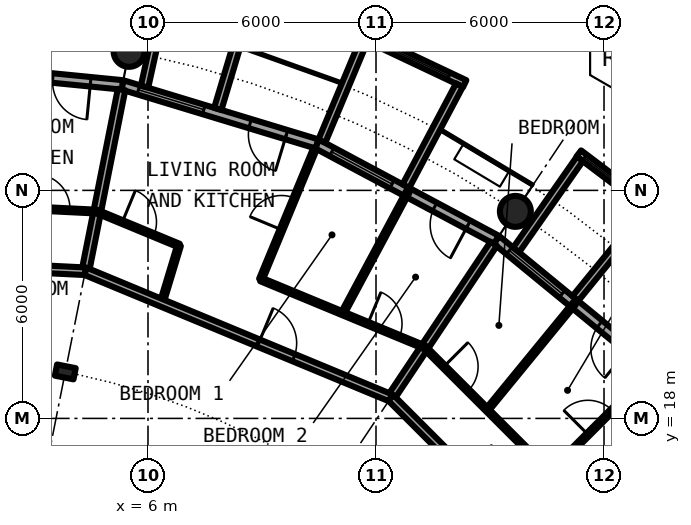
"""IFC4 building model, lengths in metres.
Left out: names, types, materials, properties, quantities, classifications, styles, units other than length and angle.
Written with IfcOpenShell. Run it as: python <this file> out.ifc"""

import sys

from ifc_helpers import new_model, si_unit, direction, frame, frame_2d, origin, origin_2d, place, context, subcontext, project, spatial, rectangle, circle, hollow_circle, i_section, extrude, element, fill, save


model = new_model("IFC4")
c1 = context("Model", 3, precision=1e-05, world=origin(), true_north=direction((0.0, 1.0)))
c2 = subcontext(c1, "Body", "Model", "MODEL_VIEW")
j1 = project(units=[si_unit("LENGTHUNIT", "METRE"), si_unit("PLANEANGLEUNIT", "RADIAN")], contexts=[c1])
p1 = place(None, origin())
s1 = spatial("IfcSite", under=j1, at=p1, CompositionType="ELEMENT")
p2 = place(p1, origin())
s2 = spatial("IfcBuilding", under=s1, at=p2, CompositionType="ELEMENT")
p3 = place(p2, frame((0.0, 0.0, 173.8)))
s3 = spatial("IfcBuildingStorey", under=s2, at=p3, CompositionType="ELEMENT", Elevation=173.8)
for number, where, z_axis, x_axis in (
    (1, (15.667, 23.448, 0.0), (0.0, 0.0, 1.0), (1.0, 0.0, 0.0)),
    (2, (5.501, 27.658, 0.0), (0.0, 0.0, 1.0), (1.0, 0.0, 0.0)),
):
    element("IfcColumn", number, at=place(p3, frame(where, z_axis=z_axis, x_axis=x_axis)), inside=s3, PredefinedType="COLUMN", context=c2, shape_type="SweptSolid", body=[
        extrude(hollow_circle(Radius=0.406, WallThickness=0.04, at=origin_2d()), origin(), (0.0, 0.0, 1.0), 3.05),
    ])
p4 = place(p3, frame((3.824, 19.223, 0.0), z_axis=(0.0, 0.0, 1.0), x_axis=(0.195090322016, 0.980785280403, 0.0)))
e3 = element("IfcColumn", 3, at=p4, inside=s3, PredefinedType="COLUMN", context=c2, shape_type="SweptSolid", body=[
    extrude(i_section(OverallWidth=0.3, OverallDepth=0.5, WebThickness=0.014, FlangeThickness=0.028, FilletRadius=0.027, at=origin_2d()), origin(), (0.0, 0.0, 1.0), 3.05),
])
p5 = place(p3, frame((19.304, 19.304, 0.0), z_axis=(0.0, 0.0, 1.0), x_axis=(-0.773019449054, 0.634382322723, 0.0)))
e4 = element("IfcWall", 4, at=p5, inside=s3, PredefinedType="SOLIDWALL", context=c2, shape_type="SweptSolid", body=[
    extrude(rectangle(XDim=5.352, YDim=0.25, at=frame_2d((2.676, 0.0))), origin(), (0.0, 0.0, 1.0), 2.7),
])
p6 = place(p5, frame((0.841, 0.0, 0.0)))
e5 = element("IfcOpeningElement", 5, at=p6, cuts=e4, PredefinedType="OPENING", context=c2, shape_type="SweptSolid", body=[
    extrude(rectangle(XDim=1.0, YDim=2.2, at=frame_2d((0.5, 1.1))), frame((0.0, 0.135, 0.0), z_axis=(0.0, -1.0, 0.0), x_axis=(1.0, 0.0, 0.0)), (0.0, 0.0, 1.0), 0.27),
])
p7 = place(p5, frame((3.111, 0.0, 0.3)))
e6 = element("IfcOpeningElement", 6, at=p7, cuts=e4, PredefinedType="OPENING", context=c2, shape_type="SweptSolid", body=[
    extrude(rectangle(XDim=1.8, YDim=2.1, at=frame_2d((0.9, 1.05))), frame((0.0, 0.135, 0.0), z_axis=(0.0, -1.0, 0.0), x_axis=(1.0, 0.0, 0.0)), (0.0, 0.0, 1.0), 0.27),
])
p8 = place(p3, frame((19.289, 23.497, -0.03), z_axis=(0.0, 0.0, 1.0), x_axis=(-0.797887588059, 0.602806268067, 0.0)))
e7 = element("IfcWall", 7, at=p8, inside=s3, PredefinedType="SOLIDWALL", context=c2, shape_type="SweptSolid", body=[
    extrude(rectangle(XDim=2.447, YDim=0.2, at=frame_2d((1.223, 0.0))), origin(), (0.0, 0.0, 1.0), 2.73),
])
p9 = place(p8, frame((0.183, 0.0, 0.33)))
e8 = element("IfcOpeningElement", 8, at=p9, cuts=e7, PredefinedType="OPENING", context=c2, shape_type="SweptSolid", body=[
    extrude(circle(Radius=1.04, at=frame_2d((1.04, 1.04))), frame((0.0, 0.11, 0.0), z_axis=(0.0, -1.0, 0.0), x_axis=(1.0, 0.0, 0.0)), (0.0, 0.0, 1.0), 0.22),
])
p10 = place(p3, frame((17.246, 21.155, -0.03), z_axis=(0.0, 0.0, 1.0), x_axis=(0.631741648902, 0.775179004516, 0.0)))
e9 = element("IfcWall", 9, at=p10, inside=s3, PredefinedType="SOLIDWALL", context=c2, shape_type="SweptSolid", body=[
    extrude(rectangle(XDim=3.006, YDim=0.2, at=frame_2d((1.503, 0.0))), origin(), (0.0, 0.0, 1.0), 2.73),
])
p11 = place(p3, frame((15.688, 22.433, -0.03), z_axis=(0.0, 0.0, 1.0), x_axis=(0.573260687834, 0.819373043115, 0.0)))
e10 = element("IfcWall", 10, at=p11, inside=s3, PredefinedType="SOLIDWALL", context=c2, shape_type="SweptSolid", body=[
    extrude(rectangle(XDim=2.925, YDim=0.2, at=frame_2d((1.463, 0.0))), origin(), (0.0, 0.0, 1.0), 2.73),
])
p12 = place(p3, frame((15.167, 22.699, 0.0), z_axis=(0.0, 0.0, 1.0), x_axis=(-0.881915646801, 0.471407246368, 0.0)))
e11 = element("IfcWall", 11, at=p12, inside=s3, PredefinedType="SOLIDWALL", context=c2, shape_type="SweptSolid", body=[
    extrude(rectangle(XDim=5.352, YDim=0.25, at=frame_2d((2.676, 0.0))), origin(), (0.0, 0.0, 1.0), 2.7),
])
p13 = place(p12, frame((0.841, 0.0, 0.0)))
e12 = element("IfcOpeningElement", 12, at=p13, cuts=e11, PredefinedType="OPENING", context=c2, shape_type="SweptSolid", body=[
    extrude(rectangle(XDim=1.0, YDim=2.2, at=frame_2d((0.5, 1.1))), frame((0.0, 0.135, 0.0), z_axis=(0.0, -1.0, 0.0), x_axis=(1.0, 0.0, 0.0)), (0.0, 0.0, 1.0), 0.27),
])
p14 = place(p12, frame((3.111, 0.0, 0.3)))
e13 = element("IfcOpeningElement", 13, at=p14, cuts=e11, PredefinedType="OPENING", context=c2, shape_type="SweptSolid", body=[
    extrude(rectangle(XDim=1.8, YDim=2.1, at=frame_2d((0.9, 1.05))), frame((0.0, 0.135, 0.0), z_axis=(0.0, -1.0, 0.0), x_axis=(1.0, 0.0, 0.0)), (0.0, 0.0, 1.0), 0.27),
])
p15 = place(p3, frame((14.335, 26.808, -0.03), z_axis=(0.0, 0.0, 1.0), x_axis=(-0.904000060331, 0.427532327342, 0.0)))
e14 = element("IfcWall", 14, at=p15, inside=s3, PredefinedType="SOLIDWALL", context=c2, shape_type="SweptSolid", body=[
    extrude(rectangle(XDim=2.993, YDim=0.2, at=frame_2d((1.497, 0.0))), origin(), (0.0, 0.0, 1.0), 2.73),
])
p16 = place(p15, frame((0.457, 0.0, 0.33)))
e15 = element("IfcOpeningElement", 15, at=p16, cuts=e14, PredefinedType="OPENING", context=c2, shape_type="SweptSolid", body=[
    extrude(circle(Radius=1.04, at=frame_2d((1.04, 1.04))), frame((0.0, 0.11, 0.0), z_axis=(0.0, -1.0, 0.0), x_axis=(1.0, 0.0, 0.0)), (0.0, 0.0, 1.0), 0.22),
])
p17 = place(p3, frame((12.787, 24.113, -0.03), z_axis=(0.0, 0.0, 1.0), x_axis=(0.468365282436, 0.883534924159, 0.0)))
e16 = element("IfcWall", 16, at=p17, inside=s3, PredefinedType="SOLIDWALL", context=c2, shape_type="SweptSolid", body=[
    extrude(rectangle(XDim=3.006, YDim=0.2, at=frame_2d((1.503, 0.0))), origin(), (0.0, 0.0, 1.0), 2.73),
])
p18 = place(p3, frame((10.575, 25.295, -0.03), z_axis=(0.0, 0.0, 1.0), x_axis=(0.385697364644, 0.922625353492, 0.0)))
e17 = element("IfcWall", 17, at=p18, inside=s3, PredefinedType="SOLIDWALL", context=c2, shape_type="SweptSolid", body=[
    extrude(rectangle(XDim=2.883, YDim=0.2, at=frame_2d((1.442, 0.0))), origin(), (0.0, 0.0, 1.0), 2.73),
])
p19 = place(p3, frame((10.447, 25.222, 0.0), z_axis=(0.0, 0.0, 1.0), x_axis=(-0.956965678721, 0.290201119486, 0.0)))
e18 = element("IfcWall", 18, at=p19, inside=s3, PredefinedType="SOLIDWALL", context=c2, shape_type="SweptSolid", body=[
    extrude(rectangle(XDim=5.351, YDim=0.25, at=frame_2d((2.676, 0.0))), origin(), (0.0, 0.0, 1.0), 2.7),
])
p20 = place(p19, frame((0.841, 0.0, 0.0)))
e19 = element("IfcOpeningElement", 19, at=p20, cuts=e18, PredefinedType="OPENING", context=c2, shape_type="SweptSolid", body=[
    extrude(rectangle(XDim=1.0, YDim=2.2, at=frame_2d((0.5, 1.1))), frame((0.0, 0.135, 0.0), z_axis=(0.0, -1.0, 0.0), x_axis=(1.0, 0.0, 0.0)), (0.0, 0.0, 1.0), 0.27),
])
p21 = place(p19, frame((3.111, 0.0, 0.3)))
e20 = element("IfcOpeningElement", 20, at=p21, cuts=e18, PredefinedType="OPENING", context=c2, shape_type="SweptSolid", body=[
    extrude(rectangle(XDim=1.8, YDim=2.1, at=frame_2d((0.9, 1.05))), frame((0.0, 0.135, 0.0), z_axis=(0.0, -1.0, 0.0), x_axis=(1.0, 0.0, 0.0)), (0.0, 0.0, 1.0), 0.27),
])
p22 = place(p3, frame((7.837, 26.144, -0.03), z_axis=(0.0, 0.0, 1.0), x_axis=(0.287064767992, 0.957911174889, 0.0)))
e21 = element("IfcWall", 21, at=p22, inside=s3, PredefinedType="SOLIDWALL", context=c2, shape_type="SweptSolid", body=[
    extrude(rectangle(XDim=3.006, YDim=0.2, at=frame_2d((1.503, 0.0))), origin(), (0.0, 0.0, 1.0), 2.73),
])
p23 = place(p3, frame((5.909, 26.729, -0.03), z_axis=(0.0, 0.0, 1.0), x_axis=(0.216409053917, 0.976302781612, 0.0)))
e22 = element("IfcWall", 22, at=p23, inside=s3, PredefinedType="SOLIDWALL", context=c2, shape_type="SweptSolid", body=[
    extrude(rectangle(XDim=2.925, YDim=0.2, at=frame_2d((1.463, 0.0))), origin(), (0.0, 0.0, 1.0), 2.73),
])
p24 = place(p3, frame((5.326, 26.775, 0.0), z_axis=(0.0, 0.0, 1.0), x_axis=(-0.995173996315, 0.098126026407, 0.0)))
e23 = element("IfcWall", 23, at=p24, inside=s3, PredefinedType="SOLIDWALL", context=c2, shape_type="SweptSolid", body=[
    extrude(rectangle(XDim=5.352, YDim=0.25, at=frame_2d((2.676, 0.0))), origin(), (0.0, 0.0, 1.0), 2.7),
])
p25 = place(p24, frame((0.841, 0.0, 0.0)))
e24 = element("IfcOpeningElement", 24, at=p25, cuts=e23, PredefinedType="OPENING", context=c2, shape_type="SweptSolid", body=[
    extrude(rectangle(XDim=1.0, YDim=2.2, at=frame_2d((0.5, 1.1))), frame((0.0, 0.135, 0.0), z_axis=(0.0, -1.0, 0.0), x_axis=(1.0, 0.0, 0.0)), (0.0, 0.0, 1.0), 0.27),
])
p26 = place(p24, frame((3.111, 0.0, 0.3)))
e25 = element("IfcOpeningElement", 25, at=p26, cuts=e23, PredefinedType="OPENING", context=c2, shape_type="SweptSolid", body=[
    extrude(rectangle(XDim=1.8, YDim=2.1, at=frame_2d((0.9, 1.05))), frame((0.0, 0.135, 0.0), z_axis=(0.0, -1.0, 0.0), x_axis=(1.0, 0.0, 0.0)), (0.0, 0.0, 1.0), 0.27),
])
p27 = place(p3, frame((4.352, 21.872, 0.0), z_axis=(0.0, 0.0, 1.0), x_axis=(0.195268525521, 0.980749816692, 0.0)))
e26 = element("IfcWall", 26, at=p27, inside=s3, PredefinedType="PARTITIONING", context=c2, shape_type="SweptSolid", body=[
    extrude(rectangle(XDim=4.875, YDim=0.2, at=frame_2d((2.438, 0.0))), origin(), (0.0, 0.0, 1.0), 2.7),
])
p28 = place(p3, frame((8.97, 21.656, 0.0), z_axis=(0.0, 0.0, 1.0), x_axis=(0.382669377748, 0.923885353999, 0.0)))
e27 = element("IfcWall", 27, at=p28, inside=s3, PredefinedType="PARTITIONING", context=c2, shape_type="SweptSolid", body=[
    extrude(rectangle(XDim=3.734, YDim=0.1, at=frame_2d((1.867, 0.0))), origin(), (0.0, 0.0, 1.0), 2.7),
])
p29 = place(p28, frame((1.417, 0.0, 0.0)))
e28 = element("IfcOpeningElement", 28, at=p29, cuts=e27, PredefinedType="OPENING", context=c2, shape_type="SweptSolid", body=[
    extrude(rectangle(XDim=0.9, YDim=2.3, at=frame_2d((0.45, 1.15))), frame((0.0, 0.06, 0.0), z_axis=(0.0, -1.0, 0.0), x_axis=(1.0, 0.0, 0.0)), (0.0, 0.0, 1.0), 0.12),
])
p30 = place(p3, frame((11.124, 20.764, 0.0), z_axis=(0.0, 0.0, 1.0), x_axis=(0.472212052488, 0.881484984265, 0.0)))
e29 = element("IfcWall", 29, at=p30, inside=s3, PredefinedType="PARTITIONING", context=c2, shape_type="SweptSolid", body=[
    extrude(rectangle(XDim=3.619, YDim=0.1, at=frame_2d((1.81, 0.0))), origin(), (0.0, 0.0, 1.0), 2.7),
])
p31 = place(p3, frame((12.389, 18.542, 0.0), z_axis=(0.0, 0.0, 1.0), x_axis=(0.55569370664, 0.831387096605, 0.0)))
e30 = element("IfcWall", 30, at=p31, inside=s3, PredefinedType="PARTITIONING", context=c2, shape_type="SweptSolid", body=[
    extrude(rectangle(XDim=4.875, YDim=0.2, at=frame_2d((2.438, 0.0))), origin(), (0.0, 0.0, 1.0), 2.7),
])
p32 = place(p3, frame((14.927, 18.224, 0.0), z_axis=(0.0, 0.0, 1.0), x_axis=(0.633737383709, 0.773548271597, 0.0)))
e31 = element("IfcWall", 31, at=p32, inside=s3, PredefinedType="PARTITIONING", context=c2, shape_type="SweptSolid", body=[
    extrude(rectangle(XDim=3.618, YDim=0.1, at=frame_2d((1.809, 0.0))), origin(), (0.0, 0.0, 1.0), 2.7),
])
p33 = place(p3, frame((16.575, 16.575, 0.0), z_axis=(0.0, 0.0, 1.0), x_axis=(0.707106781187, 0.707106781187, 0.0)))
e32 = element("IfcWall", 32, at=p33, inside=s3, PredefinedType="PARTITIONING", context=c2, shape_type="SweptSolid", body=[
    extrude(rectangle(XDim=3.735, YDim=0.1, at=frame_2d((1.868, 0.0))), origin(), (0.0, 0.0, 1.0), 2.7),
])
p34 = place(p33, frame((1.417, 0.0, 0.0)))
e33 = element("IfcOpeningElement", 33, at=p34, cuts=e32, PredefinedType="OPENING", context=c2, shape_type="SweptSolid", body=[
    extrude(rectangle(XDim=0.9, YDim=2.3, at=frame_2d((0.45, 1.15))), frame((0.0, 0.06, 0.0), z_axis=(0.0, -1.0, 0.0), x_axis=(1.0, 0.0, 0.0)), (0.0, 0.0, 1.0), 0.12),
])
p35 = place(p3, frame((6.36, 21.039, 0.0), z_axis=(0.0, 0.0, 1.0), x_axis=(0.289547780579, 0.957163561134, 0.0)))
e34 = element("IfcWall", 34, at=p35, inside=s3, PredefinedType="PARTITIONING", context=c2, shape_type="SweptSolid", body=[
    extrude(rectangle(XDim=1.578, YDim=0.1, at=frame_2d((0.789, 0.0))), origin(), (0.0, 0.0, 1.0), 2.7),
])
p36 = place(p3, frame((4.351, 21.872, 0.0), z_axis=(0.0, 0.0, 1.0), x_axis=(0.923722518166, -0.383062278792, 0.0)))
e35 = element("IfcWall", 35, at=p36, inside=s3, PredefinedType="PARTITIONING", context=c2, shape_type="SweptSolid", body=[
    extrude(rectangle(XDim=8.709, YDim=0.2, at=frame_2d((4.354, 0.0))), origin(), (0.0, 0.0, 1.0), 2.7),
])
p37 = place(p36, frame((4.938, 0.0, 0.0)))
e36 = element("IfcOpeningElement", 36, at=p37, cuts=e35, PredefinedType="OPENING", context=c2, shape_type="SweptSolid", body=[
    extrude(rectangle(XDim=1.0, YDim=2.3, at=frame_2d((0.5, 1.15))), frame((0.0, 0.11, 0.0), z_axis=(0.0, -1.0, 0.0), x_axis=(1.0, 0.0, 0.0)), (0.0, 0.0, 1.0), 0.22),
])
p38 = place(p3, frame((12.389, 18.542, 0.0), z_axis=(0.0, 0.0, 1.0), x_axis=(0.707106781187, -0.707106781187, 0.0)))
e37 = element("IfcWall", 37, at=p38, inside=s3, PredefinedType="PARTITIONING", context=c2, shape_type="SweptSolid", body=[
    extrude(rectangle(XDim=8.702, YDim=0.2, at=frame_2d((4.351, 0.0))), origin(), (0.0, 0.0, 1.0), 2.7),
])
p39 = place(p38, frame((2.763, 0.0, 0.0)))
e38 = element("IfcOpeningElement", 38, at=p39, cuts=e37, PredefinedType="OPENING", context=c2, shape_type="SweptSolid", body=[
    extrude(rectangle(XDim=1.0, YDim=2.3, at=frame_2d((0.5, 1.15))), frame((0.0, 0.11, 0.0), z_axis=(0.0, -1.0, 0.0), x_axis=(1.0, 0.0, 0.0)), (0.0, 0.0, 1.0), 0.22),
])
p40 = place(p3, frame((-2.186, 22.193, 0.0), z_axis=(0.0, 0.0, 1.0), x_axis=(0.998796224858, -0.049052025534, 0.0)))
e39 = element("IfcWall", 39, at=p40, inside=s3, PredefinedType="PARTITIONING", context=c2, shape_type="SweptSolid", body=[
    extrude(rectangle(XDim=6.545, YDim=0.2, at=frame_2d((3.272, 0.0))), origin(), (0.0, 0.0, 1.0), 2.7),
])
p41 = place(p40, frame((1.682, 0.0, 0.0)))
e40 = element("IfcOpeningElement", 40, at=p41, cuts=e39, PredefinedType="OPENING", context=c2, shape_type="SweptSolid", body=[
    extrude(rectangle(XDim=1.0, YDim=2.3, at=frame_2d((0.5, 1.15))), frame((0.0, 0.11, 0.0), z_axis=(0.0, -1.0, 0.0), x_axis=(1.0, 0.0, 0.0)), (0.0, 0.0, 1.0), 0.22),
])
p42 = place(p3, frame((4.663, 23.44, 0.0), z_axis=(0.0, 0.0, 1.0), x_axis=(0.923923664861, -0.382576870068, 0.0)))
e41 = element("IfcWall", 41, at=p42, inside=s3, PredefinedType="PARTITIONING", context=c2, shape_type="SweptSolid", body=[
    extrude(rectangle(XDim=2.331, YDim=0.1, at=frame_2d((1.166, 0.0))), origin(), (0.0, 0.0, 1.0), 2.7),
])
p43 = place(p42, frame((0.715, 0.0, 0.0)))
e42 = element("IfcOpeningElement", 42, at=p43, cuts=e41, PredefinedType="OPENING", context=c2, shape_type="SweptSolid", body=[
    extrude(rectangle(XDim=0.9, YDim=2.3, at=frame_2d((0.45, 1.15))), frame((0.0, 0.06, 0.0), z_axis=(0.0, -1.0, 0.0), x_axis=(1.0, 0.0, 0.0)), (0.0, 0.0, 1.0), 0.12),
])
p44 = place(p3, frame((8.97, 21.656, 0.0), z_axis=(0.0, 0.0, 1.0), x_axis=(0.923920484476, -0.38258455061, 0.0)))
e43 = element("IfcWall", 43, at=p44, inside=s3, PredefinedType="PARTITIONING", context=c2, shape_type="SweptSolid", body=[
    extrude(rectangle(XDim=4.663, YDim=0.1, at=frame_2d((2.332, 0.0))), origin(), (0.0, 0.0, 1.0), 2.7),
])
p45 = place(p44, frame((3.047, 0.0, 0.0)))
e44 = element("IfcOpeningElement", 44, at=p45, cuts=e43, PredefinedType="OPENING", context=c2, shape_type="SweptSolid", body=[
    extrude(rectangle(XDim=0.9, YDim=2.3, at=frame_2d((0.45, 1.15))), frame((0.0, 0.06, 0.0), z_axis=(0.0, -1.0, 0.0), x_axis=(1.0, 0.0, 0.0)), (0.0, 0.0, 1.0), 0.12),
])
p46 = place(p3, frame((13.278, 19.872, 0.0), z_axis=(0.0, 0.0, 1.0), x_axis=(0.707080600289, -0.707132961115, 0.0)))
e45 = element("IfcWall", 45, at=p46, inside=s3, PredefinedType="PARTITIONING", context=c2, shape_type="SweptSolid", body=[
    extrude(rectangle(XDim=4.663, YDim=0.1, at=frame_2d((2.331, 0.0))), origin(), (0.0, 0.0, 1.0), 2.7),
])
p47 = place(p46, frame((0.719, 0.0, 0.0)))
e46 = element("IfcOpeningElement", 46, at=p47, cuts=e45, PredefinedType="OPENING", context=c2, shape_type="SweptSolid", body=[
    extrude(rectangle(XDim=0.9, YDim=2.3, at=frame_2d((0.45, 1.15))), frame((0.0, 0.06, 0.0), z_axis=(0.0, -1.0, 0.0), x_axis=(1.0, 0.0, 0.0)), (0.0, 0.0, 1.0), 0.12),
])
p48 = place(p3, frame((2.328, 23.555, 0.0), z_axis=(0.0, 0.0, 1.0), x_axis=(0.99881024313, -0.04876574841, 0.0)))
e47 = element("IfcWall", 47, at=p48, inside=s3, PredefinedType="PARTITIONING", context=c2, shape_type="SweptSolid", body=[
    extrude(rectangle(XDim=2.338, YDim=0.1, at=frame_2d((1.169, 0.0))), origin(), (0.0, 0.0, 1.0), 2.7),
])
p49 = place(p48, frame((0.719, 0.0, 0.0)))
e48 = element("IfcOpeningElement", 48, at=p49, cuts=e47, PredefinedType="OPENING", context=c2, shape_type="SweptSolid", body=[
    extrude(rectangle(XDim=0.9, YDim=2.3, at=frame_2d((0.45, 1.15))), frame((0.0, 0.06, 0.0), z_axis=(0.0, -1.0, 0.0), x_axis=(1.0, 0.0, 0.0)), (0.0, 0.0, 1.0), 0.12),
])
p50 = place(p6, origin())
e49 = element("IfcDoor", 49, at=p50, inside=s3, OperationType="SINGLE_SWING_LEFT", PredefinedType="DOOR", context=c2, shape_type="SweptSolid", body=[
    extrude(rectangle(XDim=1.0, YDim=2.2, at=frame_2d((0.5, 1.1))), frame((0.0, 0.025, 0.0), z_axis=(0.0, -1.0, 0.0), x_axis=(1.0, 0.0, 0.0)), (0.0, 0.0, 1.0), 0.05),
])
fill(e5, e49)
p51 = place(p7, origin())
e50 = element("IfcWindow", 50, at=p51, inside=s3, PartitioningType="SINGLE_PANEL", PredefinedType="WINDOW", context=c2, shape_type="SweptSolid", body=[
    extrude(rectangle(XDim=1.8, YDim=2.1, at=frame_2d((0.9, 1.05))), frame((0.0, 0.03, 0.0), z_axis=(0.0, -1.0, 0.0), x_axis=(1.0, 0.0, 0.0)), (0.0, 0.0, 1.0), 0.06),
])
fill(e6, e50)
p52 = place(p9, origin())
e51 = element("IfcWindow", 51, at=p52, inside=s3, PartitioningType="SINGLE_PANEL", PredefinedType="WINDOW", context=c2, shape_type="SweptSolid", body=[
    extrude(circle(Radius=1.04, at=frame_2d((1.04, 1.04))), frame((0.0, 0.03, 0.0), z_axis=(0.0, -1.0, 0.0), x_axis=(1.0, 0.0, 0.0)), (0.0, 0.0, 1.0), 0.06),
])
fill(e8, e51)
p53 = place(p13, origin())
e52 = element("IfcDoor", 52, at=p53, inside=s3, OperationType="SINGLE_SWING_LEFT", PredefinedType="DOOR", context=c2, shape_type="SweptSolid", body=[
    extrude(rectangle(XDim=1.0, YDim=2.2, at=frame_2d((0.5, 1.1))), frame((0.0, 0.025, 0.0), z_axis=(0.0, -1.0, 0.0), x_axis=(1.0, 0.0, 0.0)), (0.0, 0.0, 1.0), 0.05),
])
fill(e12, e52)
p54 = place(p14, origin())
e53 = element("IfcWindow", 53, at=p54, inside=s3, PartitioningType="SINGLE_PANEL", PredefinedType="WINDOW", context=c2, shape_type="SweptSolid", body=[
    extrude(rectangle(XDim=1.8, YDim=2.1, at=frame_2d((0.9, 1.05))), frame((0.0, 0.03, 0.0), z_axis=(0.0, -1.0, 0.0), x_axis=(1.0, 0.0, 0.0)), (0.0, 0.0, 1.0), 0.06),
])
fill(e13, e53)
p55 = place(p16, origin())
e54 = element("IfcWindow", 54, at=p55, inside=s3, PartitioningType="SINGLE_PANEL", PredefinedType="WINDOW", context=c2, shape_type="SweptSolid", body=[
    extrude(circle(Radius=1.04, at=frame_2d((1.04, 1.04))), frame((0.0, 0.03, 0.0), z_axis=(0.0, -1.0, 0.0), x_axis=(1.0, 0.0, 0.0)), (0.0, 0.0, 1.0), 0.06),
])
fill(e15, e54)
p56 = place(p20, origin())
e55 = element("IfcDoor", 55, at=p56, inside=s3, OperationType="SINGLE_SWING_LEFT", PredefinedType="DOOR", context=c2, shape_type="SweptSolid", body=[
    extrude(rectangle(XDim=1.0, YDim=2.2, at=frame_2d((0.5, 1.1))), frame((0.0, 0.025, 0.0), z_axis=(0.0, -1.0, 0.0), x_axis=(1.0, 0.0, 0.0)), (0.0, 0.0, 1.0), 0.05),
])
fill(e19, e55)
p57 = place(p21, origin())
e56 = element("IfcWindow", 56, at=p57, inside=s3, PartitioningType="SINGLE_PANEL", PredefinedType="WINDOW", context=c2, shape_type="SweptSolid", body=[
    extrude(rectangle(XDim=1.8, YDim=2.1, at=frame_2d((0.9, 1.05))), frame((0.0, 0.03, 0.0), z_axis=(0.0, -1.0, 0.0), x_axis=(1.0, 0.0, 0.0)), (0.0, 0.0, 1.0), 0.06),
])
fill(e20, e56)
p58 = place(p25, origin())
e57 = element("IfcDoor", 57, at=p58, inside=s3, OperationType="SINGLE_SWING_LEFT", PredefinedType="DOOR", context=c2, shape_type="SweptSolid", body=[
    extrude(rectangle(XDim=1.0, YDim=2.2, at=frame_2d((0.5, 1.1))), frame((0.0, 0.025, 0.0), z_axis=(0.0, -1.0, 0.0), x_axis=(1.0, 0.0, 0.0)), (0.0, 0.0, 1.0), 0.05),
])
fill(e24, e57)
p59 = place(p34, origin())
e58 = element("IfcDoor", 58, at=p59, inside=s3, OperationType="SINGLE_SWING_RIGHT", PredefinedType="DOOR", context=c2, shape_type="SweptSolid", body=[
    extrude(rectangle(XDim=0.9, YDim=2.3, at=frame_2d((0.45, 1.15))), frame((0.0, 0.025, 0.0), z_axis=(0.0, -1.0, 0.0), x_axis=(1.0, 0.0, 0.0)), (0.0, 0.0, 1.0), 0.05),
])
fill(e33, e58)
p60 = place(p47, origin())
e59 = element("IfcDoor", 59, at=p60, inside=s3, OperationType="SINGLE_SWING_LEFT", PredefinedType="DOOR", context=c2, shape_type="SweptSolid", body=[
    extrude(rectangle(XDim=0.9, YDim=2.3, at=frame_2d((0.45, 1.15))), frame((0.0, 0.025, 0.0), z_axis=(0.0, -1.0, 0.0), x_axis=(1.0, 0.0, 0.0)), (0.0, 0.0, 1.0), 0.05),
])
fill(e46, e59)
p61 = place(p37, origin())
e60 = element("IfcDoor", 60, at=p61, inside=s3, OperationType="SINGLE_SWING_RIGHT", PredefinedType="DOOR", context=c2, shape_type="SweptSolid", body=[
    extrude(rectangle(XDim=1.0, YDim=2.3, at=frame_2d((0.5, 1.15))), frame((0.0, 0.025, 0.0), z_axis=(0.0, -1.0, 0.0), x_axis=(1.0, 0.0, 0.0)), (0.0, 0.0, 1.0), 0.05),
])
fill(e36, e60)
p62 = place(p43, origin())
e61 = element("IfcDoor", 61, at=p62, inside=s3, OperationType="SINGLE_SWING_LEFT", PredefinedType="DOOR", context=c2, shape_type="SweptSolid", body=[
    extrude(rectangle(XDim=0.9, YDim=2.3, at=frame_2d((0.45, 1.15))), frame((0.0, 0.025, 0.0), z_axis=(0.0, -1.0, 0.0), x_axis=(1.0, 0.0, 0.0)), (0.0, 0.0, 1.0), 0.05),
])
fill(e42, e61)
p63 = place(p29, origin())
e62 = element("IfcDoor", 62, at=p63, inside=s3, OperationType="SINGLE_SWING_RIGHT", PredefinedType="DOOR", context=c2, shape_type="SweptSolid", body=[
    extrude(rectangle(XDim=0.9, YDim=2.3, at=frame_2d((0.45, 1.15))), frame((0.0, 0.025, 0.0), z_axis=(0.0, -1.0, 0.0), x_axis=(1.0, 0.0, 0.0)), (0.0, 0.0, 1.0), 0.05),
])
fill(e28, e62)
p64 = place(p45, origin())
e63 = element("IfcDoor", 63, at=p64, inside=s3, OperationType="SINGLE_SWING_RIGHT", PredefinedType="DOOR", context=c2, shape_type="SweptSolid", body=[
    extrude(rectangle(XDim=0.9, YDim=2.3, at=frame_2d((0.45, 1.15))), frame((0.0, 0.025, 0.0), z_axis=(0.0, -1.0, 0.0), x_axis=(1.0, 0.0, 0.0)), (0.0, 0.0, 1.0), 0.05),
])
fill(e44, e63)
p65 = place(p49, origin())
e64 = element("IfcDoor", 64, at=p65, inside=s3, OperationType="SINGLE_SWING_RIGHT", PredefinedType="DOOR", context=c2, shape_type="SweptSolid", body=[
    extrude(rectangle(XDim=0.9, YDim=2.3, at=frame_2d((0.45, 1.15))), frame((0.0, 0.025, 0.0), z_axis=(0.0, -1.0, 0.0), x_axis=(1.0, 0.0, 0.0)), (0.0, 0.0, 1.0), 0.05),
])
fill(e48, e64)
save(model, sys.argv[1])
